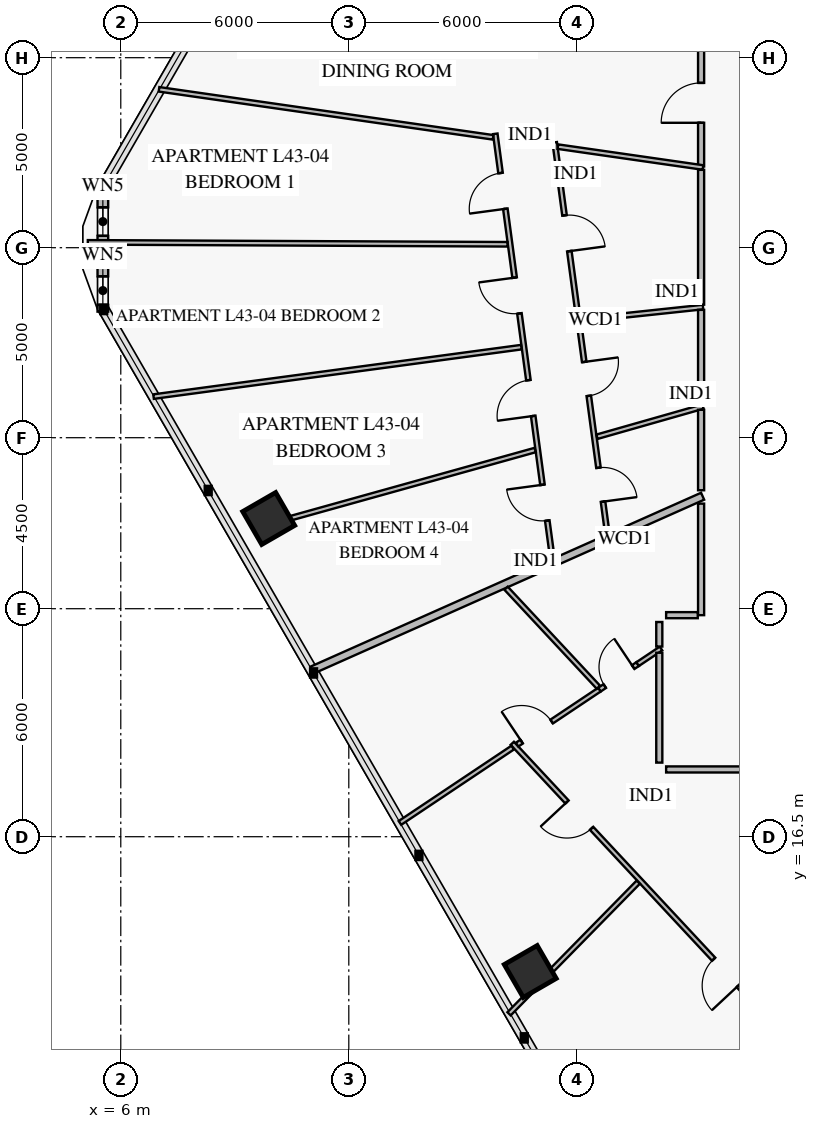
"""IFC4 building model, lengths in metres.
Left out: names, types, materials, properties, quantities, classifications, styles, units other than length and angle.
Written with IfcOpenShell. Run it as: python <this file> out.ifc"""

import sys

from ifc_helpers import new_model, si_unit, direction, frame, frame_2d, origin, origin_2d, place, context, subcontext, project, spatial, rectangle, extrude, element, fill, save


model = new_model("IFC4")
c1 = context("Model", 3, precision=1e-05, world=origin(), true_north=direction((0.0, 1.0)))
c2 = subcontext(c1, "Body", "Model", "MODEL_VIEW")
j1 = project(units=[si_unit("LENGTHUNIT", "METRE"), si_unit("PLANEANGLEUNIT", "RADIAN")], contexts=[c1])
p1 = place(None, origin())
s1 = spatial("IfcSite", under=j1, at=p1, CompositionType="ELEMENT")
p2 = place(p1, origin())
s2 = spatial("IfcBuilding", under=s1, at=p2, CompositionType="ELEMENT")
p3 = place(p2, frame((0.0, 0.0, 173.2)))
s3 = spatial("IfcBuildingStorey", under=s2, at=p3, CompositionType="ELEMENT", Elevation=173.2)
for number, where, z_axis, x_axis in (
    (1, (9.892, 24.874, 0.0), (0.0, 0.0, 1.0), (0.5, -0.866, 0.0)),
    (2, (16.774, 12.953, 0.0), (0.0, 0.0, 1.0), (0.5, -0.866, 0.0)),
):
    element("IfcColumn", number, at=place(p3, frame(where, z_axis=z_axis, x_axis=x_axis)), inside=s3, PredefinedType="COLUMN", context=c2, shape_type="SweptSolid", body=[
        extrude(rectangle(XDim=1.0, YDim=1.0, at=origin_2d()), origin(), (0.0, 0.0, 1.0), 3.55),
    ])
p4 = place(p3, frame((5.528, 30.317, 0.0), z_axis=(0.0, 0.0, 1.0), x_axis=(0.0, 1.0, 0.0)))
e3 = element("IfcWall", 3, at=p4, inside=s3, PredefinedType="SOLIDWALL", context=c2, shape_type="SweptSolid", body=[
    extrude(rectangle(XDim=3.365, YDim=0.28, at=frame_2d((1.683, 0.0))), origin(), (0.0, 0.0, 1.0), 3.55),
])
p5 = place(p4, frame((1.994, 0.0, 0.85)))
e4 = element("IfcOpeningElement", 4, at=p5, cuts=e3, PredefinedType="OPENING", context=c2, shape_type="SweptSolid", body=[
    extrude(rectangle(XDim=0.75, YDim=1.5, at=frame_2d((0.375, 0.75))), frame((0.0, 0.152, 0.0), z_axis=(0.0, -1.0, 0.0), x_axis=(1.0, 0.0, 0.0)), (0.0, 0.0, 1.0), 0.304),
])
p6 = place(p4, frame((0.179, 0.0, 0.85)))
e5 = element("IfcOpeningElement", 5, at=p6, cuts=e3, PredefinedType="OPENING", context=c2, shape_type="SweptSolid", body=[
    extrude(rectangle(XDim=0.75, YDim=1.5, at=frame_2d((0.375, 0.75))), frame((0.0, 0.152, 0.0), z_axis=(0.0, -1.0, 0.0), x_axis=(1.0, 0.0, 0.0)), (0.0, 0.0, 1.0), 0.304),
])
p7 = place(p3, frame((17.418, 34.772, 0.0), z_axis=(0.0, 0.0, 1.0), x_axis=(0.133300793384, -0.991075627025, 0.0)))
e6 = element("IfcWall", 6, at=p7, inside=s3, PredefinedType="PARTITIONING", context=c2, shape_type="SweptSolid", body=[
    extrude(rectangle(XDim=10.449, YDim=0.12, at=frame_2d((5.224, 0.0))), origin(), (0.0, 0.0, 1.0), 2.9),
])
p8 = place(p7, frame((1.94, 0.0, 0.0)))
e7 = element("IfcOpeningElement", 7, at=p8, cuts=e6, PredefinedType="OPENING", context=c2, shape_type="SweptSolid", body=[
    extrude(rectangle(XDim=0.95, YDim=2.1, at=frame_2d((0.475, 1.05))), frame((0.0, 0.072, 0.0), z_axis=(0.0, -1.0, 0.0), x_axis=(1.0, 0.0, 0.0)), (0.0, 0.0, 1.0), 0.144),
])
p9 = place(p7, frame((5.831, 0.0, 0.0)))
e8 = element("IfcOpeningElement", 8, at=p9, cuts=e6, PredefinedType="OPENING", context=c2, shape_type="SweptSolid", body=[
    extrude(rectangle(XDim=0.9, YDim=2.1, at=frame_2d((0.45, 1.05))), frame((0.0, 0.072, 0.0), z_axis=(0.0, -1.0, 0.0), x_axis=(1.0, 0.0, 0.0)), (0.0, 0.0, 1.0), 0.144),
])
p10 = place(p7, frame((8.64, 0.0, 0.0)))
e9 = element("IfcOpeningElement", 9, at=p10, cuts=e6, PredefinedType="OPENING", context=c2, shape_type="SweptSolid", body=[
    extrude(rectangle(XDim=0.9, YDim=2.1, at=frame_2d((0.45, 1.05))), frame((0.0, 0.072, 0.0), z_axis=(0.0, -1.0, 0.0), x_axis=(1.0, 0.0, 0.0)), (0.0, 0.0, 1.0), 0.144),
])
p11 = place(p3, frame((15.854, 34.997, 0.0), z_axis=(0.0, 0.0, 1.0), x_axis=(0.133279106394, -0.991078543708, 0.0)))
e10 = element("IfcWall", 10, at=p11, inside=s3, PredefinedType="PARTITIONING", context=c2, shape_type="SweptSolid", body=[
    extrude(rectangle(XDim=11.311, YDim=0.12, at=frame_2d((5.656, 0.0))), origin(), (0.0, 0.0, 1.0), 2.9),
])
p12 = place(p11, frame((1.042, 0.0, 0.0)))
e11 = element("IfcOpeningElement", 11, at=p12, cuts=e10, PredefinedType="OPENING", context=c2, shape_type="SweptSolid", body=[
    extrude(rectangle(XDim=0.95, YDim=2.1, at=frame_2d((0.475, 1.05))), frame((0.0, 0.072, 0.0), z_axis=(0.0, -1.0, 0.0), x_axis=(1.0, 0.0, 0.0)), (0.0, 0.0, 1.0), 0.144),
])
p13 = place(p11, frame((3.819, 0.0, 0.0)))
e12 = element("IfcOpeningElement", 12, at=p13, cuts=e10, PredefinedType="OPENING", context=c2, shape_type="SweptSolid", body=[
    extrude(rectangle(XDim=0.95, YDim=2.1, at=frame_2d((0.475, 1.05))), frame((0.0, 0.072, 0.0), z_axis=(0.0, -1.0, 0.0), x_axis=(1.0, 0.0, 0.0)), (0.0, 0.0, 1.0), 0.144),
])
p14 = place(p11, frame((6.542, 0.0, 0.0)))
e13 = element("IfcOpeningElement", 13, at=p14, cuts=e10, PredefinedType="OPENING", context=c2, shape_type="SweptSolid", body=[
    extrude(rectangle(XDim=0.95, YDim=2.1, at=frame_2d((0.475, 1.05))), frame((0.0, 0.072, 0.0), z_axis=(0.0, -1.0, 0.0), x_axis=(1.0, 0.0, 0.0)), (0.0, 0.0, 1.0), 0.144),
])
p15 = place(p11, frame((9.32, 0.0, 0.0)))
e14 = element("IfcOpeningElement", 14, at=p15, cuts=e10, PredefinedType="OPENING", context=c2, shape_type="SweptSolid", body=[
    extrude(rectangle(XDim=0.95, YDim=2.1, at=frame_2d((0.475, 1.05))), frame((0.0, 0.072, 0.0), z_axis=(0.0, -1.0, 0.0), x_axis=(1.0, 0.0, 0.0)), (0.0, 0.0, 1.0), 0.144),
])
p16 = place(p3, frame((21.27, 37.486, 0.0), z_axis=(0.0, 0.0, 1.0), x_axis=(0.0, -1.0, 0.0)))
e15 = element("IfcWall", 15, at=p16, inside=s3, PredefinedType="PARTITIONING", context=c2, shape_type="SweptSolid", body=[
    extrude(rectangle(XDim=3.348, YDim=0.16, at=frame_2d((1.674, 0.0))), origin(), (0.0, 0.0, 1.0), 2.9),
])
p17 = place(p16, frame((1.149, 0.0, 0.0)))
e16 = element("IfcOpeningElement", 16, at=p17, cuts=e15, PredefinedType="OPENING", context=c2, shape_type="SweptSolid", body=[
    extrude(rectangle(XDim=1.05, YDim=2.15, at=frame_2d((0.525, 1.075))), frame((0.0, 0.092, 0.0), z_axis=(0.0, -1.0, 0.0), x_axis=(1.0, 0.0, 0.0)), (0.0, 0.0, 1.0), 0.184),
])
p18 = place(p3, frame((16.302, 18.958, 0.0), z_axis=(0.0, 0.0, 1.0), x_axis=(0.681998933698, -0.731353166695, 0.0)))
e17 = element("IfcWall", 17, at=p18, inside=s3, PredefinedType="PARTITIONING", context=c2, shape_type="SweptSolid", body=[
    extrude(rectangle(XDim=11.798, YDim=0.12, at=frame_2d((5.899, 0.0))), origin(), (0.0, 0.0, 1.0), 2.9),
])
p19 = place(p18, frame((2.11, 0.0, 0.0)))
e18 = element("IfcOpeningElement", 18, at=p19, cuts=e17, PredefinedType="OPENING", context=c2, shape_type="SweptSolid", body=[
    extrude(rectangle(XDim=0.95, YDim=2.1, at=frame_2d((0.475, 1.05))), frame((0.0, 0.072, 0.0), z_axis=(0.0, -1.0, 0.0), x_axis=(1.0, 0.0, 0.0)), (0.0, 0.0, 1.0), 0.144),
])
p20 = place(p18, frame((7.769, 0.0, 0.0)))
e19 = element("IfcOpeningElement", 19, at=p20, cuts=e17, PredefinedType="OPENING", context=c2, shape_type="SweptSolid", body=[
    extrude(rectangle(XDim=0.95, YDim=2.1, at=frame_2d((0.475, 1.05))), frame((0.0, 0.072, 0.0), z_axis=(0.0, -1.0, 0.0), x_axis=(1.0, 0.0, 0.0)), (0.0, 0.0, 1.0), 0.144),
])
p21 = place(p3, frame((19.6, 21.042, 0.0), z_axis=(0.0, 0.0, 1.0), x_axis=(-0.831460345356, -0.555584101735, 0.0)))
e20 = element("IfcWall", 20, at=p21, inside=s3, PredefinedType="PARTITIONING", context=c2, shape_type="SweptSolid", body=[
    extrude(rectangle(XDim=1.211, YDim=0.12, at=frame_2d((0.605, 0.0))), origin(), (0.0, 0.0, 1.0), 3.15),
])
p22 = place(p21, frame((0.14, 0.0, 0.0)))
e21 = element("IfcOpeningElement", 21, at=p22, cuts=e20, PredefinedType="OPENING", context=c2, shape_type="SweptSolid", body=[
    extrude(rectangle(XDim=0.9, YDim=2.1, at=frame_2d((0.45, 1.05))), frame((0.0, 0.072, 0.0), z_axis=(0.0, -1.0, 0.0), x_axis=(1.0, 0.0, 0.0)), (0.0, 0.0, 1.0), 0.144),
])
p23 = place(p3, frame((18.594, 20.369, 0.0), z_axis=(0.0, 0.0, 1.0), x_axis=(-0.831487480853, -0.555543489913, 0.0)))
e22 = element("IfcWall", 22, at=p23, inside=s3, PredefinedType="PARTITIONING", context=c2, shape_type="SweptSolid", body=[
    extrude(rectangle(XDim=2.605, YDim=0.12, at=frame_2d((1.302, 0.0))), origin(), (0.0, 0.0, 1.0), 3.55),
])
p24 = place(p23, frame((1.51, 0.0, 0.0)))
e23 = element("IfcOpeningElement", 23, at=p24, cuts=e22, PredefinedType="OPENING", context=c2, shape_type="SweptSolid", body=[
    extrude(rectangle(XDim=0.95, YDim=2.1, at=frame_2d((0.475, 1.05))), frame((0.0, 0.072, 0.0), z_axis=(0.0, -1.0, 0.0), x_axis=(1.0, 0.0, 0.0)), (0.0, 0.0, 1.0), 0.144),
])
p25 = place(p3, frame((16.313, 18.846, 0.0), z_axis=(0.0, 0.0, 1.0), x_axis=(-0.831481603923, -0.555552285872, 0.0)))
e24 = element("IfcWall", 24, at=p25, inside=s3, PredefinedType="PARTITIONING", context=c2, shape_type="SweptSolid", body=[
    extrude(rectangle(XDim=3.569, YDim=0.12, at=frame_2d((1.785, 0.0))), origin(), (0.0, 0.0, 1.0), 2.87),
])
p26 = place(p3, frame((20.35, 18.27, 0.0), z_axis=(0.0, 0.0, 1.0), x_axis=(1.0, 0.0, 0.0)))
e25 = element("IfcWall", 25, at=p26, inside=s3, PredefinedType="PARTITIONING", context=c2, shape_type="SweptSolid", body=[
    extrude(rectangle(XDim=8.172, YDim=0.16, at=frame_2d((4.086, 0.0))), origin(), (0.0, 0.0, 1.0), 2.9),
])
p27 = place(p26, frame((3.561, 0.0, 0.0)))
e26 = element("IfcOpeningElement", 26, at=p27, cuts=e25, PredefinedType="OPENING", context=c2, shape_type="SweptSolid", body=[
    extrude(rectangle(XDim=1.05, YDim=2.15, at=frame_2d((0.525, 1.075))), frame((0.0, 0.092, 0.0), z_axis=(0.0, -1.0, 0.0), x_axis=(1.0, 0.0, 0.0)), (0.0, 0.0, 1.0), 0.184),
])
p28 = place(p3, frame((21.32, 30.438, 0.0), z_axis=(0.0, 0.0, 1.0), x_axis=(-0.994376869396, -0.105899204953, 0.0)))
e27 = element("IfcWall", 27, at=p28, inside=s3, PredefinedType="PARTITIONING", context=c2, shape_type="SweptSolid", body=[
    extrude(rectangle(XDim=3.223, YDim=0.12, at=frame_2d((1.611, 0.0))), origin(), (0.0, 0.0, 1.0), 3.55),
])
p29 = place(p3, frame((21.32, 27.819, 0.0), z_axis=(0.0, 0.0, 1.0), x_axis=(-0.961771119413, -0.273854548737, 0.0)))
e28 = element("IfcWall", 28, at=p29, inside=s3, PredefinedType="PARTITIONING", context=c2, shape_type="SweptSolid", body=[
    extrude(rectangle(XDim=2.903, YDim=0.12, at=frame_2d((1.451, 0.0))), origin(), (0.0, 0.0, 1.0), 2.9),
])
p30 = place(p3, frame((16.176, 32.09, 0.0), z_axis=(0.0, 0.0, 1.0), x_axis=(-0.999989631639, 0.004553747245, 0.0)))
e29 = element("IfcWall", 29, at=p30, inside=s3, PredefinedType="PARTITIONING", context=c2, shape_type="SweptSolid", body=[
    extrude(rectangle(XDim=11.044, YDim=0.12, at=frame_2d((5.522, 0.0))), origin(), (0.0, 0.0, 1.0), 2.87),
])
p31 = place(p3, frame((16.54, 29.383, 0.0), z_axis=(0.0, 0.0, 1.0), x_axis=(-0.991077690838, -0.133285448281, 0.0)))
e30 = element("IfcWall", 30, at=p31, inside=s3, PredefinedType="PARTITIONING", context=c2, shape_type="SweptSolid", body=[
    extrude(rectangle(XDim=9.765, YDim=0.12, at=frame_2d((4.882, 0.0))), origin(), (0.0, 0.0, 1.0), 2.87),
])
p32 = place(p3, frame((16.904, 26.676, 0.0), z_axis=(0.0, 0.0, 1.0), x_axis=(-0.963259527587, -0.26857230407, 0.0)))
e31 = element("IfcWall", 31, at=p32, inside=s3, PredefinedType="PARTITIONING", context=c2, shape_type="SweptSolid", body=[
    extrude(rectangle(XDim=6.74, YDim=0.12, at=frame_2d((3.37, 0.0))), origin(), (0.0, 0.0, 1.0), 2.9),
])
p33 = place(p3, frame((21.32, 34.11, 0.0), z_axis=(0.0, 0.0, 1.0), x_axis=(-0.989818700467, 0.142333903923, 0.0)))
e32 = element("IfcWall", 32, at=p33, inside=s3, PredefinedType="PARTITIONING", context=c2, shape_type="SweptSolid", body=[
    extrude(rectangle(XDim=3.858, YDim=0.12, at=frame_2d((1.929, 0.0))), origin(), (0.0, 0.0, 1.0), 3.55),
])
p34 = place(p3, frame((15.798, 34.904, 0.0), z_axis=(0.0, 0.0, 1.0), x_axis=(-0.989827080259, 0.142275616979, 0.0)))
e33 = element("IfcWall", 33, at=p34, inside=s3, PredefinedType="PARTITIONING", context=c2, shape_type="SweptSolid", body=[
    extrude(rectangle(XDim=8.882, YDim=0.12, at=frame_2d((4.441, 0.0))), origin(), (0.0, 0.0, 1.0), 2.87),
])
p35 = place(p3, frame((21.31, 25.46, 0.0), z_axis=(0.0, 0.0, 1.0), x_axis=(-0.913543837416, -0.406740282146, 0.0)))
e34 = element("IfcWall", 34, at=p35, inside=s3, PredefinedType="PARTITIONING", context=c2, shape_type="SweptSolid", body=[
    extrude(rectangle(XDim=11.253, YDim=0.2, at=frame_2d((5.626, 0.0))), origin(), (0.0, 0.0, 1.0), 2.87),
])
p36 = place(p3, frame((19.616, 15.304, 0.0), z_axis=(0.0, 0.0, 1.0), x_axis=(-0.700410055049, -0.713740677548, 0.0)))
e35 = element("IfcWall", 35, at=p36, inside=s3, PredefinedType="PARTITIONING", context=c2, shape_type="SweptSolid", body=[
    extrude(rectangle(XDim=3.315, YDim=0.12, at=frame_2d((1.657, 0.0))), origin(), (0.0, 0.0, 1.0), 3.55),
])
p37 = place(p3, frame((16.8, 12.433, 0.0), z_axis=(0.0, 0.0, 1.0), x_axis=(-0.700476016825, -0.713675941765, 0.0)))
e36 = element("IfcWall", 36, at=p37, inside=s3, PredefinedType="PARTITIONING", context=c2, shape_type="SweptSolid", body=[
    extrude(rectangle(XDim=0.832, YDim=0.12, at=frame_2d((0.416, 0.0))), origin(), (0.0, 0.0, 1.0), 3.122),
])
p38 = place(p3, frame((20.215, 21.453, 0.0), z_axis=(0.0, 0.0, 1.0), x_axis=(-0.831491262241, -0.555537830231, 0.0)))
e37 = element("IfcWall", 37, at=p38, inside=s3, PredefinedType="PARTITIONING", context=c2, shape_type="SweptSolid", body=[
    extrude(rectangle(XDim=0.74, YDim=0.12, at=frame_2d((0.37, 0.0))), origin(), (0.0, 0.0, 1.0), 3.55),
])
p39 = place(p3, frame((16.138, 23.039, 0.0), z_axis=(0.0, 0.0, 1.0), x_axis=(0.682000707563, -0.731351512532, 0.0)))
e38 = element("IfcWall", 38, at=p39, inside=s3, PredefinedType="PARTITIONING", context=c2, shape_type="SweptSolid", body=[
    extrude(rectangle(XDim=3.562, YDim=0.12, at=frame_2d((1.781, 0.0))), origin(), (0.0, 0.0, 1.0), 3.55),
])
p40 = place(p3, frame((28.721, 18.31, 0.0), z_axis=(0.0, 0.0, 1.0), x_axis=(-0.469463317487, -0.882951976913, 0.0)))
e39 = element("IfcWall", 39, at=p40, inside=s3, PredefinedType="PARTITIONING", context=c2, shape_type="SweptSolid", body=[
    extrude(rectangle(XDim=15.178, YDim=0.2, at=frame_2d((7.589, 0.0))), origin(), (0.0, 0.0, 1.0), 2.87),
])
p41 = place(p3, frame((21.27, 34.049, 0.0), z_axis=(0.0, 0.0, 1.0), x_axis=(0.0, -1.0, 0.0)))
e40 = element("IfcWall", 40, at=p41, inside=s3, PredefinedType="PARTITIONING", context=c2, shape_type="SweptSolid", body=[
    extrude(rectangle(XDim=3.548, YDim=0.16, at=frame_2d((1.774, 0.0))), origin(), (0.0, 0.0, 1.0), 3.55),
])
p42 = place(p3, frame((21.27, 30.364, 0.0), z_axis=(0.0, 0.0, 1.0), x_axis=(0.0, -1.0, 0.0)))
e41 = element("IfcWall", 41, at=p42, inside=s3, PredefinedType="PARTITIONING", context=c2, shape_type="SweptSolid", body=[
    extrude(rectangle(XDim=2.488, YDim=0.16, at=frame_2d((1.244, 0.0))), origin(), (0.0, 0.0, 1.0), 2.9),
])
p43 = place(p3, frame((21.27, 27.734, 0.0), z_axis=(0.0, 0.0, 1.0), x_axis=(0.0, -1.0, 0.0)))
e42 = element("IfcWall", 42, at=p43, inside=s3, PredefinedType="PARTITIONING", context=c2, shape_type="SweptSolid", body=[
    extrude(rectangle(XDim=2.117, YDim=0.16, at=frame_2d((1.059, 0.0))), origin(), (0.0, 0.0, 1.0), 3.55),
])
p44 = place(p3, frame((20.17, 21.341, 0.0), z_axis=(0.0, 0.0, 1.0), x_axis=(0.0, -1.0, 0.0)))
e43 = element("IfcWall", 43, at=p44, inside=s3, PredefinedType="PARTITIONING", context=c2, shape_type="SweptSolid", body=[
    extrude(rectangle(XDim=2.891, YDim=0.16, at=frame_2d((1.446, 0.0))), origin(), (0.0, 0.0, 1.0), 3.15),
])
p45 = place(p3, frame((21.27, 25.265, 0.0), z_axis=(0.0, 0.0, 1.0), x_axis=(0.0, -1.0, 0.0)))
e44 = element("IfcWall", 44, at=p45, inside=s3, PredefinedType="PARTITIONING", context=c2, shape_type="SweptSolid", body=[
    extrude(rectangle(XDim=2.935, YDim=0.16, at=frame_2d((1.468, 0.0))), origin(), (0.0, 0.0, 1.0), 3.55),
])
p46 = place(p3, frame((21.182, 22.33, 0.0), z_axis=(0.0, 0.0, 1.0), x_axis=(-1.0, 0.0, 0.0)))
e45 = element("IfcWall", 45, at=p46, inside=s3, PredefinedType="PARTITIONING", context=c2, shape_type="SweptSolid", body=[
    extrude(rectangle(XDim=0.832, YDim=0.16, at=frame_2d((0.416, 0.0))), origin(), (0.0, 0.0, 1.0), 3.55),
])
p47 = place(p3, frame((20.17, 22.15, 0.0), z_axis=(0.0, 0.0, 1.0), x_axis=(0.0, -1.0, 0.0)))
e46 = element("IfcWall", 46, at=p47, inside=s3, PredefinedType="PARTITIONING", context=c2, shape_type="SweptSolid", body=[
    extrude(rectangle(XDim=0.646, YDim=0.16, at=frame_2d((0.323, 0.0))), origin(), (0.0, 0.0, 1.0), 3.55),
])
p48 = place(p5, origin())
e47 = element("IfcWindow", 47, at=p48, inside=s3, PartitioningType="SINGLE_PANEL", PredefinedType="WINDOW", context=c2, shape_type="SweptSolid", body=[
    extrude(rectangle(XDim=0.75, YDim=1.5, at=frame_2d((0.375, 0.75))), frame((0.0, 0.03, 0.0), z_axis=(0.0, -1.0, 0.0), x_axis=(1.0, 0.0, 0.0)), (0.0, 0.0, 1.0), 0.06),
])
fill(e4, e47)
p49 = place(p6, origin())
e48 = element("IfcWindow", 48, at=p49, inside=s3, PartitioningType="SINGLE_PANEL", PredefinedType="WINDOW", context=c2, shape_type="SweptSolid", body=[
    extrude(rectangle(XDim=0.75, YDim=1.5, at=frame_2d((0.375, 0.75))), frame((0.0, 0.03, 0.0), z_axis=(0.0, -1.0, 0.0), x_axis=(1.0, 0.0, 0.0)), (0.0, 0.0, 1.0), 0.06),
])
fill(e5, e48)
p50 = place(p8, origin())
e49 = element("IfcDoor", 49, at=p50, inside=s3, OperationType="SINGLE_SWING_RIGHT", PredefinedType="DOOR", context=c2, shape_type="SweptSolid", body=[
    extrude(rectangle(XDim=0.95, YDim=2.1, at=frame_2d((0.475, 1.05))), frame((0.0, 0.025, 0.0), z_axis=(0.0, -1.0, 0.0), x_axis=(1.0, 0.0, 0.0)), (0.0, 0.0, 1.0), 0.05),
])
fill(e7, e49)
p51 = place(p9, origin())
e50 = element("IfcDoor", 50, at=p51, inside=s3, OperationType="SINGLE_SWING_LEFT", PredefinedType="DOOR", context=c2, shape_type="SweptSolid", body=[
    extrude(rectangle(XDim=0.9, YDim=2.1, at=frame_2d((0.45, 1.05))), frame((0.0, 0.025, 0.0), z_axis=(0.0, -1.0, 0.0), x_axis=(1.0, 0.0, 0.0)), (0.0, 0.0, 1.0), 0.05),
])
fill(e8, e50)
p52 = place(p10, origin())
e51 = element("IfcDoor", 51, at=p52, inside=s3, OperationType="SINGLE_SWING_RIGHT", PredefinedType="DOOR", context=c2, shape_type="SweptSolid", body=[
    extrude(rectangle(XDim=0.9, YDim=2.1, at=frame_2d((0.45, 1.05))), frame((0.0, 0.025, 0.0), z_axis=(0.0, -1.0, 0.0), x_axis=(1.0, 0.0, 0.0)), (0.0, 0.0, 1.0), 0.05),
])
fill(e9, e51)
p53 = place(p12, frame((0.95, 0.0, 0.0), z_axis=(0.0, 0.0, 1.0), x_axis=(-1.0, 0.0, 0.0)))
e52 = element("IfcDoor", 52, at=p53, inside=s3, OperationType="SINGLE_SWING_LEFT", PredefinedType="DOOR", context=c2, shape_type="SweptSolid", body=[
    extrude(rectangle(XDim=0.95, YDim=2.1, at=frame_2d((0.475, 1.05))), frame((0.0, 0.025, 0.0), z_axis=(0.0, -1.0, 0.0), x_axis=(1.0, 0.0, 0.0)), (0.0, 0.0, 1.0), 0.05),
])
fill(e11, e52)
p54 = place(p13, frame((0.95, 0.0, 0.0), z_axis=(0.0, 0.0, 1.0), x_axis=(-1.0, 0.0, 0.0)))
e53 = element("IfcDoor", 53, at=p54, inside=s3, OperationType="SINGLE_SWING_RIGHT", PredefinedType="DOOR", context=c2, shape_type="SweptSolid", body=[
    extrude(rectangle(XDim=0.95, YDim=2.1, at=frame_2d((0.475, 1.05))), frame((0.0, 0.025, 0.0), z_axis=(0.0, -1.0, 0.0), x_axis=(1.0, 0.0, 0.0)), (0.0, 0.0, 1.0), 0.05),
])
fill(e12, e53)
p55 = place(p14, frame((0.95, 0.0, 0.0), z_axis=(0.0, 0.0, 1.0), x_axis=(-1.0, 0.0, 0.0)))
e54 = element("IfcDoor", 54, at=p55, inside=s3, OperationType="SINGLE_SWING_LEFT", PredefinedType="DOOR", context=c2, shape_type="SweptSolid", body=[
    extrude(rectangle(XDim=0.95, YDim=2.1, at=frame_2d((0.475, 1.05))), frame((0.0, 0.025, 0.0), z_axis=(0.0, -1.0, 0.0), x_axis=(1.0, 0.0, 0.0)), (0.0, 0.0, 1.0), 0.05),
])
fill(e13, e54)
p56 = place(p15, frame((0.95, 0.0, 0.0), z_axis=(0.0, 0.0, 1.0), x_axis=(-1.0, 0.0, 0.0)))
e55 = element("IfcDoor", 55, at=p56, inside=s3, OperationType="SINGLE_SWING_RIGHT", PredefinedType="DOOR", context=c2, shape_type="SweptSolid", body=[
    extrude(rectangle(XDim=0.95, YDim=2.1, at=frame_2d((0.475, 1.05))), frame((0.0, 0.025, 0.0), z_axis=(0.0, -1.0, 0.0), x_axis=(1.0, 0.0, 0.0)), (0.0, 0.0, 1.0), 0.05),
])
fill(e14, e55)
p57 = place(p17, frame((1.05, 0.0, 0.0), z_axis=(0.0, 0.0, 1.0), x_axis=(-1.0, 0.0, 0.0)))
e56 = element("IfcDoor", 56, at=p57, inside=s3, OperationType="SINGLE_SWING_LEFT", PredefinedType="DOOR", context=c2, shape_type="SweptSolid", body=[
    extrude(rectangle(XDim=1.05, YDim=2.15, at=frame_2d((0.525, 1.075))), frame((0.0, 0.025, 0.0), z_axis=(0.0, -1.0, 0.0), x_axis=(1.0, 0.0, 0.0)), (0.0, 0.0, 1.0), 0.05),
])
fill(e16, e56)
p58 = place(p19, frame((0.95, 0.0, 0.0), z_axis=(0.0, 0.0, 1.0), x_axis=(-1.0, 0.0, 0.0)))
e57 = element("IfcDoor", 57, at=p58, inside=s3, OperationType="SINGLE_SWING_RIGHT", PredefinedType="DOOR", context=c2, shape_type="SweptSolid", body=[
    extrude(rectangle(XDim=0.95, YDim=2.1, at=frame_2d((0.475, 1.05))), frame((0.0, 0.025, 0.0), z_axis=(0.0, -1.0, 0.0), x_axis=(1.0, 0.0, 0.0)), (0.0, 0.0, 1.0), 0.05),
])
fill(e18, e57)
p59 = place(p20, frame((0.95, 0.0, 0.0), z_axis=(0.0, 0.0, 1.0), x_axis=(-1.0, 0.0, 0.0)))
e58 = element("IfcDoor", 58, at=p59, inside=s3, OperationType="SINGLE_SWING_LEFT", PredefinedType="DOOR", context=c2, shape_type="SweptSolid", body=[
    extrude(rectangle(XDim=0.95, YDim=2.1, at=frame_2d((0.475, 1.05))), frame((0.0, 0.025, 0.0), z_axis=(0.0, -1.0, 0.0), x_axis=(1.0, 0.0, 0.0)), (0.0, 0.0, 1.0), 0.05),
])
fill(e19, e58)
p60 = place(p22, frame((0.9, 0.0, 0.0), z_axis=(0.0, 0.0, 1.0), x_axis=(-1.0, 0.0, 0.0)))
e59 = element("IfcDoor", 59, at=p60, inside=s3, OperationType="SINGLE_SWING_RIGHT", PredefinedType="DOOR", context=c2, shape_type="SweptSolid", body=[
    extrude(rectangle(XDim=0.9, YDim=2.1, at=frame_2d((0.45, 1.05))), frame((0.0, 0.025, 0.0), z_axis=(0.0, -1.0, 0.0), x_axis=(1.0, 0.0, 0.0)), (0.0, 0.0, 1.0), 0.05),
])
fill(e21, e59)
p61 = place(p24, frame((0.95, 0.0, 0.0), z_axis=(0.0, 0.0, 1.0), x_axis=(-1.0, 0.0, 0.0)))
e60 = element("IfcDoor", 60, at=p61, inside=s3, OperationType="SINGLE_SWING_LEFT", PredefinedType="DOOR", context=c2, shape_type="SweptSolid", body=[
    extrude(rectangle(XDim=0.95, YDim=2.1, at=frame_2d((0.475, 1.05))), frame((0.0, 0.025, 0.0), z_axis=(0.0, -1.0, 0.0), x_axis=(1.0, 0.0, 0.0)), (0.0, 0.0, 1.0), 0.05),
])
fill(e23, e60)
save(model, sys.argv[1])
